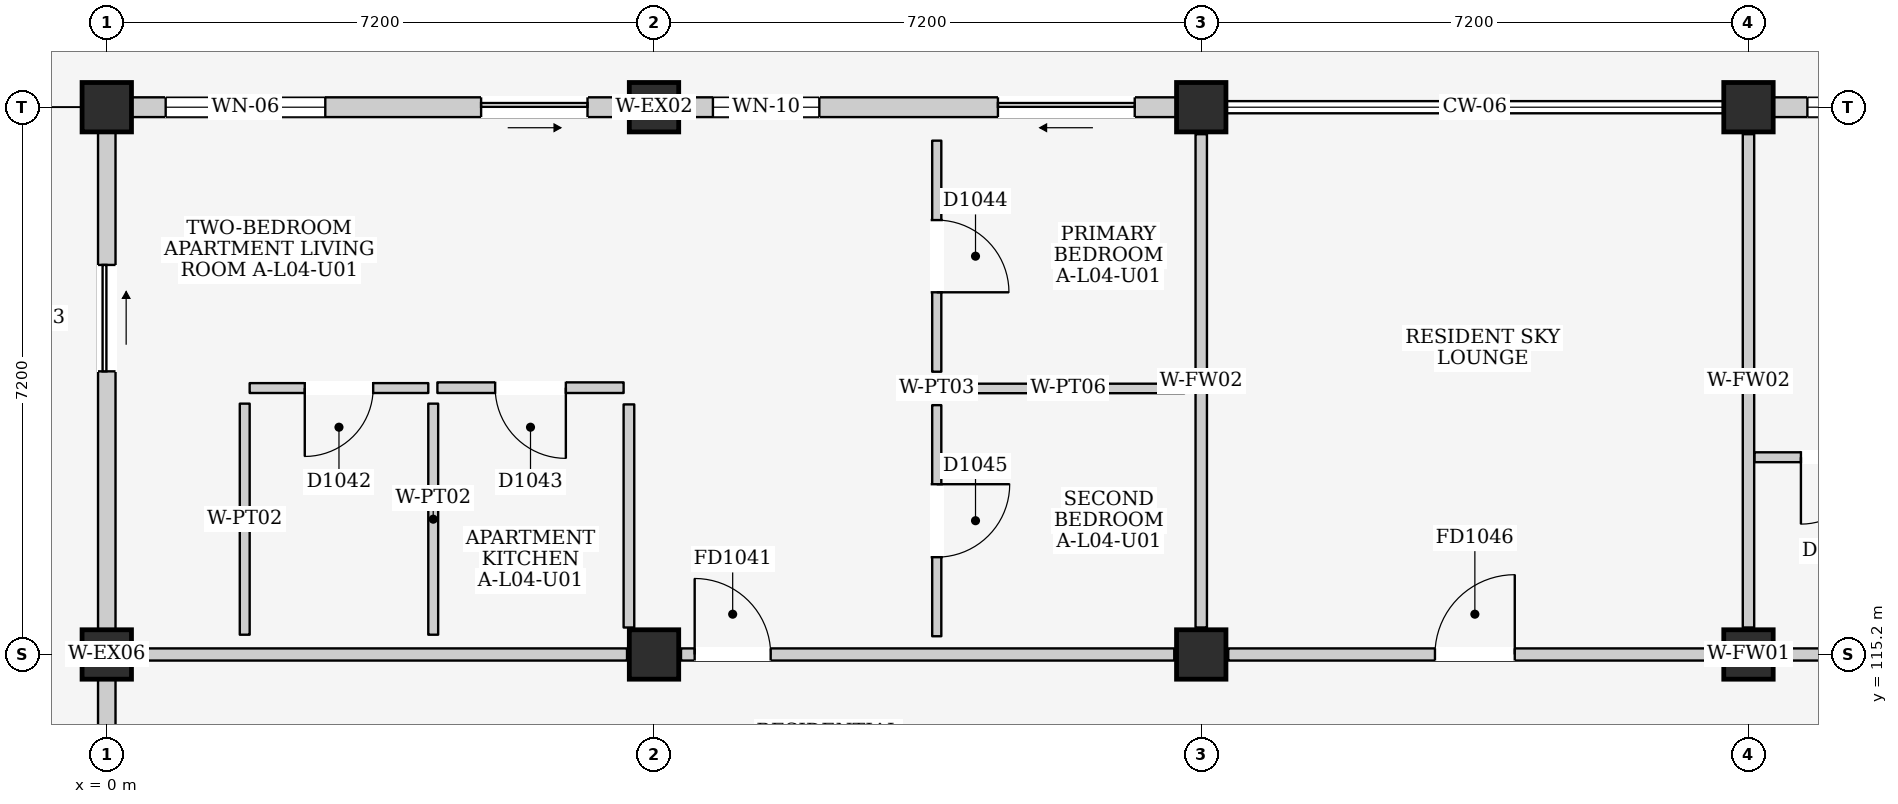
"""IFC4 building model, lengths in metres.
Left out: names, types, materials, properties, quantities, classifications, styles, units other than length and angle.
Written with IfcOpenShell. Run it as: python <this file> out.ifc"""

import sys

from ifc_helpers import new_model, si_unit, direction, frame, frame_2d, origin, origin_2d, place, context, subcontext, project, spatial, rectangle, extrude, element, fill, save


model = new_model("IFC4")
c1 = context("Model", 3, precision=1e-05, world=origin(), true_north=direction((0.0, 1.0)))
c2 = subcontext(c1, "Body", "Model", "MODEL_VIEW")
j1 = project(units=[si_unit("LENGTHUNIT", "METRE"), si_unit("PLANEANGLEUNIT", "RADIAN")], contexts=[c1])
p1 = place(None, origin())
s1 = spatial("IfcSite", under=j1, at=p1, CompositionType="ELEMENT")
p2 = place(p1, origin())
s2 = spatial("IfcBuilding", under=s1, at=p2, CompositionType="ELEMENT")
p3 = place(p2, frame((0.0, 0.0, 15.4)))
s3 = spatial("IfcBuildingStorey", under=s2, at=p3, CompositionType="ELEMENT", Elevation=15.4)
for number, where, z_axis, x_axis in (
    (1, (0.0, 115.2, 0.0), (0.0, 0.0, 1.0), (1.0, 0.0, 0.0)),
    (2, (0.0, 122.4, 0.0), (0.0, 0.0, 1.0), (1.0, 0.0, 0.0)),
    (3, (7.2, 115.2, 0.0), (0.0, 0.0, 1.0), (1.0, 0.0, 0.0)),
    (4, (7.2, 122.4, 0.0), (0.0, 0.0, 1.0), (1.0, 0.0, 0.0)),
    (5, (14.4, 115.2, 0.0), (0.0, 0.0, 1.0), (1.0, 0.0, 0.0)),
    (6, (14.4, 122.4, 0.0), (0.0, 0.0, 1.0), (1.0, 0.0, 0.0)),
    (7, (21.6, 115.2, 0.0), (0.0, 0.0, 1.0), (1.0, 0.0, 0.0)),
    (8, (21.6, 122.4, 0.0), (0.0, 0.0, 1.0), (1.0, 0.0, 0.0)),
):
    element("IfcColumn", number, at=place(p3, frame(where, z_axis=z_axis, x_axis=x_axis)), inside=s3, PredefinedType="COLUMN", context=c2, shape_type="SweptSolid", body=[
        extrude(rectangle(XDim=0.65, YDim=0.65, at=origin_2d()), origin(), (0.0, 0.0, 1.0), 3.2),
    ])
p4 = place(p3, frame((0.325, 122.4, 0.0), z_axis=(0.0, 0.0, 1.0), x_axis=(1.0, 0.0, 0.0)))
e9 = element("IfcWall", 9, at=p4, inside=s3, PredefinedType="ELEMENTEDWALL", context=c2, shape_type="SweptSolid", body=[
    extrude(rectangle(XDim=6.55, YDim=0.26, at=frame_2d((3.275, 0.0))), origin(), (0.0, 0.0, 1.0), 2.43),
])
p5 = place(p4, frame((4.6, 0.0, 0.0)))
e10 = element("IfcOpeningElement", 10, at=p5, cuts=e9, PredefinedType="OPENING", context=c2, shape_type="SweptSolid", body=[
    extrude(rectangle(XDim=1.4, YDim=2.1, at=frame_2d((0.7, 1.05))), frame((0.0, 0.145, 0.0), z_axis=(0.0, -1.0, 0.0), x_axis=(1.0, 0.0, 0.0)), (0.0, 0.0, 1.0), 0.29),
])
p6 = place(p4, frame((0.45, 0.0, 0.66)))
e11 = element("IfcOpeningElement", 11, at=p6, cuts=e9, PredefinedType="OPENING", context=c2, shape_type="SweptSolid", body=[
    extrude(rectangle(XDim=2.1, YDim=1.65, at=frame_2d((1.05, 0.825))), frame((0.0, 0.145, 0.0), z_axis=(0.0, -1.0, 0.0), x_axis=(1.0, 0.0, 0.0)), (0.0, 0.0, 1.0), 0.29),
])
p7 = place(p3, frame((7.525, 122.4, 0.0), z_axis=(0.0, 0.0, 1.0), x_axis=(1.0, 0.0, 0.0)))
e12 = element("IfcWall", 12, at=p7, inside=s3, PredefinedType="ELEMENTEDWALL", context=c2, shape_type="SweptSolid", body=[
    extrude(rectangle(XDim=6.55, YDim=0.26, at=frame_2d((3.275, 0.0))), origin(), (0.0, 0.0, 1.0), 2.43),
])
p8 = place(p7, frame((4.2, 0.0, 0.0)))
e13 = element("IfcOpeningElement", 13, at=p8, cuts=e12, PredefinedType="OPENING", context=c2, shape_type="SweptSolid", body=[
    extrude(rectangle(XDim=1.8, YDim=2.12, at=frame_2d((0.9, 1.06))), frame((0.0, 0.145, 0.0), z_axis=(0.0, -1.0, 0.0), x_axis=(1.0, 0.0, 0.0)), (0.0, 0.0, 1.0), 0.29),
])
p9 = place(p7, frame((0.45, 0.0, 0.9)))
e14 = element("IfcOpeningElement", 14, at=p9, cuts=e12, PredefinedType="OPENING", context=c2, shape_type="SweptSolid", body=[
    extrude(rectangle(XDim=1.4, YDim=1.2, at=frame_2d((0.7, 0.6))), frame((0.0, 0.145, 0.0), z_axis=(0.0, -1.0, 0.0), x_axis=(1.0, 0.0, 0.0)), (0.0, 0.0, 1.0), 0.29),
])
p10 = place(p3, frame((21.925, 122.4, 0.0), z_axis=(0.0, 0.0, 1.0), x_axis=(1.0, 0.0, 0.0)))
e15 = element("IfcWall", 15, at=p10, inside=s3, PredefinedType="ELEMENTEDWALL", context=c2, shape_type="SweptSolid", body=[
    extrude(rectangle(XDim=6.55, YDim=0.26, at=frame_2d((3.275, 0.0))), origin(), (0.0, 0.0, 1.0), 2.43),
])
p11 = place(p10, frame((4.5, 0.0, 0.0)))
e16 = element("IfcOpeningElement", 16, at=p11, cuts=e15, PredefinedType="OPENING", context=c2, shape_type="SweptSolid", body=[
    extrude(rectangle(XDim=1.5, YDim=2.12, at=frame_2d((0.75, 1.06))), frame((0.0, 0.145, 0.0), z_axis=(0.0, -1.0, 0.0), x_axis=(1.0, 0.0, 0.0)), (0.0, 0.0, 1.0), 0.29),
])
p12 = place(p10, frame((0.45, 0.0, 0.86)))
e17 = element("IfcOpeningElement", 17, at=p12, cuts=e15, PredefinedType="OPENING", context=c2, shape_type="SweptSolid", body=[
    extrude(rectangle(XDim=1.7, YDim=1.45, at=frame_2d((0.85, 0.725))), frame((0.0, 0.145, 0.0), z_axis=(0.0, -1.0, 0.0), x_axis=(1.0, 0.0, 0.0)), (0.0, 0.0, 1.0), 0.29),
])
p13 = place(p3, frame((0.0, 108.325, 0.0), z_axis=(0.0, 0.0, 1.0), x_axis=(0.0, 1.0, 0.0)))
e18 = element("IfcWall", 18, at=p13, inside=s3, PredefinedType="ELEMENTEDWALL", context=c2, shape_type="SweptSolid", body=[
    extrude(rectangle(XDim=6.55, YDim=0.23, at=frame_2d((3.275, 0.0))), origin(), (0.0, 0.0, 1.0), 2.43),
])
p14 = place(p13, frame((2.75, 0.0, 1.1)))
e19 = element("IfcOpeningElement", 19, at=p14, cuts=e18, PredefinedType="OPENING", context=c2, shape_type="SweptSolid", body=[
    extrude(rectangle(XDim=1.0, YDim=0.9, at=frame_2d((0.5, 0.45))), frame((0.0, 0.13, 0.0), z_axis=(0.0, -1.0, 0.0), x_axis=(1.0, 0.0, 0.0)), (0.0, 0.0, 1.0), 0.26),
])
p15 = place(p3, frame((0.0, 115.525, 0.0), z_axis=(0.0, 0.0, 1.0), x_axis=(0.0, 1.0, 0.0)))
e20 = element("IfcWall", 20, at=p15, inside=s3, PredefinedType="ELEMENTEDWALL", context=c2, shape_type="SweptSolid", body=[
    extrude(rectangle(XDim=6.55, YDim=0.23, at=frame_2d((3.275, 0.0))), origin(), (0.0, 0.0, 1.0), 2.43),
])
p16 = place(p15, frame((3.4, 0.0, 0.0)))
e21 = element("IfcOpeningElement", 21, at=p16, cuts=e20, PredefinedType="OPENING", context=c2, shape_type="SweptSolid", body=[
    extrude(rectangle(XDim=1.4, YDim=2.1, at=frame_2d((0.7, 1.05))), frame((0.0, 0.13, 0.0), z_axis=(0.0, -1.0, 0.0), x_axis=(1.0, 0.0, 0.0)), (0.0, 0.0, 1.0), 0.26),
])
p17 = place(p3, frame((0.355, 115.2, 0.0), z_axis=(0.0, 0.0, 1.0), x_axis=(1.0, 0.0, 0.0)))
e22 = element("IfcWall", 22, at=p17, inside=s3, PredefinedType="PARTITIONING", context=c2, shape_type="SweptSolid", body=[
    extrude(rectangle(XDim=6.49, YDim=0.16, at=frame_2d((3.245, 0.0))), origin(), (0.0, 0.0, 1.0), 2.285),
])
p18 = place(p3, frame((7.555, 115.2, 0.0), z_axis=(0.0, 0.0, 1.0), x_axis=(1.0, 0.0, 0.0)))
e23 = element("IfcWall", 23, at=p18, inside=s3, PredefinedType="PARTITIONING", context=c2, shape_type="SweptSolid", body=[
    extrude(rectangle(XDim=6.49, YDim=0.16, at=frame_2d((3.245, 0.0))), origin(), (0.0, 0.0, 1.0), 2.285),
])
p19 = place(p18, frame((0.18, 0.0, 0.0)))
e24 = element("IfcOpeningElement", 24, at=p19, cuts=e23, PredefinedType="OPENING", context=c2, shape_type="SweptSolid", body=[
    extrude(rectangle(XDim=1.0, YDim=2.15, at=frame_2d((0.5, 1.075))), frame((0.0, 0.095, 0.0), z_axis=(0.0, -1.0, 0.0), x_axis=(1.0, 0.0, 0.0)), (0.0, 0.0, 1.0), 0.19),
])
p20 = place(p3, frame((14.4, 115.555, 0.0), z_axis=(0.0, 0.0, 1.0), x_axis=(0.0, 1.0, 0.0)))
e25 = element("IfcWall", 25, at=p20, inside=s3, PredefinedType="PARTITIONING", context=c2, shape_type="SweptSolid", body=[
    extrude(rectangle(XDim=6.49, YDim=0.15, at=frame_2d((3.245, 0.0))), origin(), (0.0, 0.0, 1.0), 2.385),
])
p21 = place(p3, frame((1.88, 118.705, 0.0), z_axis=(0.0, 0.0, 1.0), x_axis=(1.0, 0.0, 0.0)))
e26 = element("IfcWall", 26, at=p21, inside=s3, PredefinedType="PARTITIONING", context=c2, shape_type="SweptSolid", body=[
    extrude(rectangle(XDim=2.35, YDim=0.13, at=frame_2d((1.175, 0.0))), origin(), (0.0, 0.0, 1.0), 2.95),
])
p22 = place(p21, frame((0.725, 0.0, 0.0)))
e27 = element("IfcOpeningElement", 27, at=p22, cuts=e26, PredefinedType="OPENING", context=c2, shape_type="SweptSolid", body=[
    extrude(rectangle(XDim=0.9, YDim=2.1, at=frame_2d((0.45, 1.05))), frame((0.0, 0.08, 0.0), z_axis=(0.0, -1.0, 0.0), x_axis=(1.0, 0.0, 0.0)), (0.0, 0.0, 1.0), 0.16),
])
for number, where, z_axis, x_axis in (
    (28, (4.295, 115.46, 0.0), (0.0, 0.0, 1.0), (0.0, 1.0, 0.0)),
    (29, (1.815, 115.46, 0.0), (0.0, 0.0, 1.0), (0.0, 1.0, 0.0)),
):
    element("IfcWall", number, at=place(p3, frame(where, z_axis=z_axis, x_axis=x_axis)), inside=s3, PredefinedType="PARTITIONING", context=c2, shape_type="SweptSolid", body=[
        extrude(rectangle(XDim=3.04, YDim=0.13, at=frame_2d((1.52, 0.0))), origin(), (0.0, 0.0, 1.0), 2.95),
    ])
p23 = place(p3, frame((4.35, 118.71, 0.0), z_axis=(0.0, 0.0, 1.0), x_axis=(1.0, 0.0, 0.0)))
e30 = element("IfcWall", 30, at=p23, inside=s3, PredefinedType="PARTITIONING", context=c2, shape_type="SweptSolid", body=[
    extrude(rectangle(XDim=2.45, YDim=0.14, at=frame_2d((1.225, 0.0))), origin(), (0.0, 0.0, 1.0), 2.95),
])
p24 = place(p23, frame((0.76, 0.0, 0.0)))
e31 = element("IfcOpeningElement", 31, at=p24, cuts=e30, PredefinedType="OPENING", context=c2, shape_type="SweptSolid", body=[
    extrude(rectangle(XDim=0.93, YDim=2.14, at=frame_2d((0.465, 1.07))), frame((0.0, 0.085, 0.0), z_axis=(0.0, -1.0, 0.0), x_axis=(1.0, 0.0, 0.0)), (0.0, 0.0, 1.0), 0.17),
])
p25 = place(p3, frame((6.87, 115.555, 0.0), z_axis=(0.0, 0.0, 1.0), x_axis=(0.0, 1.0, 0.0)))
e32 = element("IfcWall", 32, at=p25, inside=s3, PredefinedType="PARTITIONING", context=c2, shape_type="SweptSolid", body=[
    extrude(rectangle(XDim=2.935, YDim=0.14, at=frame_2d((1.468, 0.0))), origin(), (0.0, 0.0, 1.0), 2.95),
])
p26 = place(p3, frame((10.92, 118.92, 0.0), z_axis=(0.0, 0.0, 1.0), x_axis=(0.0, 1.0, 0.0)))
e33 = element("IfcWall", 33, at=p26, inside=s3, PredefinedType="PARTITIONING", context=c2, shape_type="SweptSolid", body=[
    extrude(rectangle(XDim=3.04, YDim=0.12, at=frame_2d((1.52, 0.0))), origin(), (0.0, 0.0, 1.0), 2.95),
])
p27 = place(p26, frame((1.045, 0.0, 0.0)))
e34 = element("IfcOpeningElement", 34, at=p27, cuts=e33, PredefinedType="OPENING", context=c2, shape_type="SweptSolid", body=[
    extrude(rectangle(XDim=0.95, YDim=2.15, at=frame_2d((0.475, 1.075))), frame((0.0, 0.075, 0.0), z_axis=(0.0, -1.0, 0.0), x_axis=(1.0, 0.0, 0.0)), (0.0, 0.0, 1.0), 0.15),
])
p28 = place(p3, frame((11.12, 118.7, 0.0), z_axis=(0.0, 0.0, 1.0), x_axis=(1.0, 0.0, 0.0)))
e35 = element("IfcWall", 35, at=p28, inside=s3, PredefinedType="PARTITIONING", context=c2, shape_type="SweptSolid", body=[
    extrude(rectangle(XDim=3.06, YDim=0.125, at=frame_2d((1.53, 0.0))), origin(), (0.0, 0.0, 1.0), 2.95),
])
p29 = place(p3, frame((10.92, 115.44, 0.0), z_axis=(0.0, 0.0, 1.0), x_axis=(0.0, 1.0, 0.0)))
e36 = element("IfcWall", 36, at=p29, inside=s3, PredefinedType="PARTITIONING", context=c2, shape_type="SweptSolid", body=[
    extrude(rectangle(XDim=3.04, YDim=0.12, at=frame_2d((1.52, 0.0))), origin(), (0.0, 0.0, 1.0), 2.95),
])
p30 = place(p29, frame((1.04, 0.0, 0.0)))
e37 = element("IfcOpeningElement", 37, at=p30, cuts=e36, PredefinedType="OPENING", context=c2, shape_type="SweptSolid", body=[
    extrude(rectangle(XDim=0.96, YDim=2.15, at=frame_2d((0.48, 1.075))), frame((0.0, 0.075, 0.0), z_axis=(0.0, -1.0, 0.0), x_axis=(1.0, 0.0, 0.0)), (0.0, 0.0, 1.0), 0.15),
])
p31 = place(p3, frame((14.755, 115.2, 0.0), z_axis=(0.0, 0.0, 1.0), x_axis=(1.0, 0.0, 0.0)))
e38 = element("IfcWall", 38, at=p31, inside=s3, PredefinedType="PARTITIONING", context=c2, shape_type="SweptSolid", body=[
    extrude(rectangle(XDim=6.49, YDim=0.16, at=frame_2d((3.245, 0.0))), origin(), (0.0, 0.0, 1.0), 2.285),
])
p32 = place(p31, frame((2.72, 0.0, 0.0)))
e39 = element("IfcOpeningElement", 39, at=p32, cuts=e38, PredefinedType="OPENING", context=c2, shape_type="SweptSolid", body=[
    extrude(rectangle(XDim=1.05, YDim=2.15, at=frame_2d((0.525, 1.075))), frame((0.0, 0.095, 0.0), z_axis=(0.0, -1.0, 0.0), x_axis=(1.0, 0.0, 0.0)), (0.0, 0.0, 1.0), 0.19),
])
p33 = place(p3, frame((21.6, 115.555, 0.0), z_axis=(0.0, 0.0, 1.0), x_axis=(0.0, 1.0, 0.0)))
e40 = element("IfcWall", 40, at=p33, inside=s3, PredefinedType="PARTITIONING", context=c2, shape_type="SweptSolid", body=[
    extrude(rectangle(XDim=6.49, YDim=0.15, at=frame_2d((3.245, 0.0))), origin(), (0.0, 0.0, 1.0), 2.385),
])
p34 = place(p3, frame((21.955, 115.2, 0.0), z_axis=(0.0, 0.0, 1.0), x_axis=(1.0, 0.0, 0.0)))
e41 = element("IfcWall", 41, at=p34, inside=s3, PredefinedType="PARTITIONING", context=c2, shape_type="SweptSolid", body=[
    extrude(rectangle(XDim=6.49, YDim=0.16, at=frame_2d((3.245, 0.0))), origin(), (0.0, 0.0, 1.0), 2.285),
])
p35 = place(p34, frame((2.745, 0.0, 0.0)))
e42 = element("IfcOpeningElement", 42, at=p35, cuts=e41, PredefinedType="OPENING", context=c2, shape_type="SweptSolid", body=[
    extrude(rectangle(XDim=1.0, YDim=2.15, at=frame_2d((0.5, 1.075))), frame((0.0, 0.095, 0.0), z_axis=(0.0, -1.0, 0.0), x_axis=(1.0, 0.0, 0.0)), (0.0, 0.0, 1.0), 0.19),
])
p36 = place(p3, frame((21.68, 117.795, 0.0), z_axis=(0.0, 0.0, 1.0), x_axis=(1.0, 0.0, 0.0)))
e43 = element("IfcWall", 43, at=p36, inside=s3, PredefinedType="PARTITIONING", context=c2, shape_type="SweptSolid", body=[
    extrude(rectangle(XDim=2.1, YDim=0.13, at=frame_2d((1.05, 0.0))), origin(), (0.0, 0.0, 1.0), 2.95),
])
p37 = place(p36, frame((0.61, 0.0, 0.0)))
e44 = element("IfcOpeningElement", 44, at=p37, cuts=e43, PredefinedType="OPENING", context=c2, shape_type="SweptSolid", body=[
    extrude(rectangle(XDim=0.88, YDim=2.1, at=frame_2d((0.44, 1.05))), frame((0.0, 0.08, 0.0), z_axis=(0.0, -1.0, 0.0), x_axis=(1.0, 0.0, 0.0)), (0.0, 0.0, 1.0), 0.16),
])
p38 = place(p5, frame((1.4, 0.0, 0.0), z_axis=(0.0, 0.0, 1.0), x_axis=(-1.0, 0.0, 0.0)))
e45 = element("IfcDoor", 45, at=p38, inside=s3, OperationType="SLIDING_TO_RIGHT", PredefinedType="DOOR", context=c2, shape_type="SweptSolid", body=[
    extrude(rectangle(XDim=1.4, YDim=2.1, at=frame_2d((0.7, 1.05))), frame((0.0, 0.025, 0.0), z_axis=(0.0, -1.0, 0.0), x_axis=(1.0, 0.0, 0.0)), (0.0, 0.0, 1.0), 0.05),
])
fill(e10, e45)
p39 = place(p6, origin())
e46 = element("IfcWindow", 46, at=p39, inside=s3, PartitioningType="DOUBLE_PANEL_VERTICAL", PredefinedType="WINDOW", context=c2, shape_type="SweptSolid", body=[
    extrude(rectangle(XDim=2.1, YDim=1.65, at=frame_2d((1.05, 0.825))), frame((0.0, 0.03, 0.0), z_axis=(0.0, -1.0, 0.0), x_axis=(1.0, 0.0, 0.0)), (0.0, 0.0, 1.0), 0.06),
])
fill(e11, e46)
p40 = place(p8, frame((1.8, 0.0, 0.0), z_axis=(0.0, 0.0, 1.0), x_axis=(-1.0, 0.0, 0.0)))
e47 = element("IfcDoor", 47, at=p40, inside=s3, OperationType="SLIDING_TO_LEFT", PredefinedType="DOOR", context=c2, shape_type="SweptSolid", body=[
    extrude(rectangle(XDim=1.8, YDim=2.12, at=frame_2d((0.9, 1.06))), frame((0.0, 0.025, 0.0), z_axis=(0.0, -1.0, 0.0), x_axis=(1.0, 0.0, 0.0)), (0.0, 0.0, 1.0), 0.05),
])
fill(e13, e47)
p41 = place(p9, origin())
e48 = element("IfcWindow", 48, at=p41, inside=s3, PartitioningType="DOUBLE_PANEL_HORIZONTAL", PredefinedType="WINDOW", context=c2, shape_type="SweptSolid", body=[
    extrude(rectangle(XDim=1.4, YDim=1.2, at=frame_2d((0.7, 0.6))), frame((0.0, 0.03, 0.0), z_axis=(0.0, -1.0, 0.0), x_axis=(1.0, 0.0, 0.0)), (0.0, 0.0, 1.0), 0.06),
])
fill(e14, e48)
p42 = place(p12, origin())
e49 = element("IfcWindow", 49, at=p42, inside=s3, PartitioningType="DOUBLE_PANEL_VERTICAL", PredefinedType="WINDOW", context=c2, shape_type="SweptSolid", body=[
    extrude(rectangle(XDim=1.7, YDim=1.45, at=frame_2d((0.85, 0.725))), frame((0.0, 0.03, 0.0), z_axis=(0.0, -1.0, 0.0), x_axis=(1.0, 0.0, 0.0)), (0.0, 0.0, 1.0), 0.06),
])
fill(e17, e49)
p43 = place(p16, frame((1.4, 0.0, 0.0), z_axis=(0.0, 0.0, 1.0), x_axis=(-1.0, 0.0, 0.0)))
e50 = element("IfcDoor", 50, at=p43, inside=s3, OperationType="SLIDING_TO_RIGHT", PredefinedType="DOOR", context=c2, shape_type="SweptSolid", body=[
    extrude(rectangle(XDim=1.4, YDim=2.1, at=frame_2d((0.7, 1.05))), frame((0.0, 0.025, 0.0), z_axis=(0.0, -1.0, 0.0), x_axis=(1.0, 0.0, 0.0)), (0.0, 0.0, 1.0), 0.05),
])
fill(e21, e50)
p44 = place(p19, origin())
e51 = element("IfcDoor", 51, at=p44, inside=s3, OperationType="SINGLE_SWING_LEFT", PredefinedType="DOOR", context=c2, shape_type="SweptSolid", body=[
    extrude(rectangle(XDim=1.0, YDim=2.15, at=frame_2d((0.5, 1.075))), frame((0.0, 0.025, 0.0), z_axis=(0.0, -1.0, 0.0), x_axis=(1.0, 0.0, 0.0)), (0.0, 0.0, 1.0), 0.05),
])
fill(e24, e51)
p45 = place(p22, frame((0.9, 0.0, 0.0), z_axis=(0.0, 0.0, 1.0), x_axis=(-1.0, 0.0, 0.0)))
e52 = element("IfcDoor", 52, at=p45, inside=s3, OperationType="SINGLE_SWING_RIGHT", PredefinedType="DOOR", context=c2, shape_type="SweptSolid", body=[
    extrude(rectangle(XDim=0.9, YDim=2.1, at=frame_2d((0.45, 1.05))), frame((0.0, 0.025, 0.0), z_axis=(0.0, -1.0, 0.0), x_axis=(1.0, 0.0, 0.0)), (0.0, 0.0, 1.0), 0.05),
])
fill(e27, e52)
p46 = place(p24, frame((0.93, 0.0, 0.0), z_axis=(0.0, 0.0, 1.0), x_axis=(-1.0, 0.0, 0.0)))
e53 = element("IfcDoor", 53, at=p46, inside=s3, OperationType="SINGLE_SWING_LEFT", PredefinedType="DOOR", context=c2, shape_type="SweptSolid", body=[
    extrude(rectangle(XDim=0.93, YDim=2.14, at=frame_2d((0.465, 1.07))), frame((0.0, 0.025, 0.0), z_axis=(0.0, -1.0, 0.0), x_axis=(1.0, 0.0, 0.0)), (0.0, 0.0, 1.0), 0.05),
])
fill(e31, e53)
p47 = place(p27, frame((0.95, 0.0, 0.0), z_axis=(0.0, 0.0, 1.0), x_axis=(-1.0, 0.0, 0.0)))
e54 = element("IfcDoor", 54, at=p47, inside=s3, OperationType="SINGLE_SWING_RIGHT", PredefinedType="DOOR", context=c2, shape_type="SweptSolid", body=[
    extrude(rectangle(XDim=0.95, YDim=2.15, at=frame_2d((0.475, 1.075))), frame((0.0, 0.025, 0.0), z_axis=(0.0, -1.0, 0.0), x_axis=(1.0, 0.0, 0.0)), (0.0, 0.0, 1.0), 0.05),
])
fill(e34, e54)
p48 = place(p30, frame((0.96, 0.0, 0.0), z_axis=(0.0, 0.0, 1.0), x_axis=(-1.0, 0.0, 0.0)))
e55 = element("IfcDoor", 55, at=p48, inside=s3, OperationType="SINGLE_SWING_LEFT", PredefinedType="DOOR", context=c2, shape_type="SweptSolid", body=[
    extrude(rectangle(XDim=0.96, YDim=2.15, at=frame_2d((0.48, 1.075))), frame((0.0, 0.025, 0.0), z_axis=(0.0, -1.0, 0.0), x_axis=(1.0, 0.0, 0.0)), (0.0, 0.0, 1.0), 0.05),
])
fill(e37, e55)
p49 = place(p32, origin())
e56 = element("IfcDoor", 56, at=p49, inside=s3, OperationType="SINGLE_SWING_RIGHT", PredefinedType="DOOR", context=c2, shape_type="SweptSolid", body=[
    extrude(rectangle(XDim=1.05, YDim=2.15, at=frame_2d((0.525, 1.075))), frame((0.0, 0.025, 0.0), z_axis=(0.0, -1.0, 0.0), x_axis=(1.0, 0.0, 0.0)), (0.0, 0.0, 1.0), 0.05),
])
fill(e39, e56)
p50 = place(p37, frame((0.88, 0.0, 0.0), z_axis=(0.0, 0.0, 1.0), x_axis=(-1.0, 0.0, 0.0)))
e57 = element("IfcDoor", 57, at=p50, inside=s3, OperationType="SINGLE_SWING_RIGHT", PredefinedType="DOOR", context=c2, shape_type="SweptSolid", body=[
    extrude(rectangle(XDim=0.88, YDim=2.1, at=frame_2d((0.44, 1.05))), frame((0.0, 0.025, 0.0), z_axis=(0.0, -1.0, 0.0), x_axis=(1.0, 0.0, 0.0)), (0.0, 0.0, 1.0), 0.05),
])
fill(e44, e57)
save(model, sys.argv[1])
